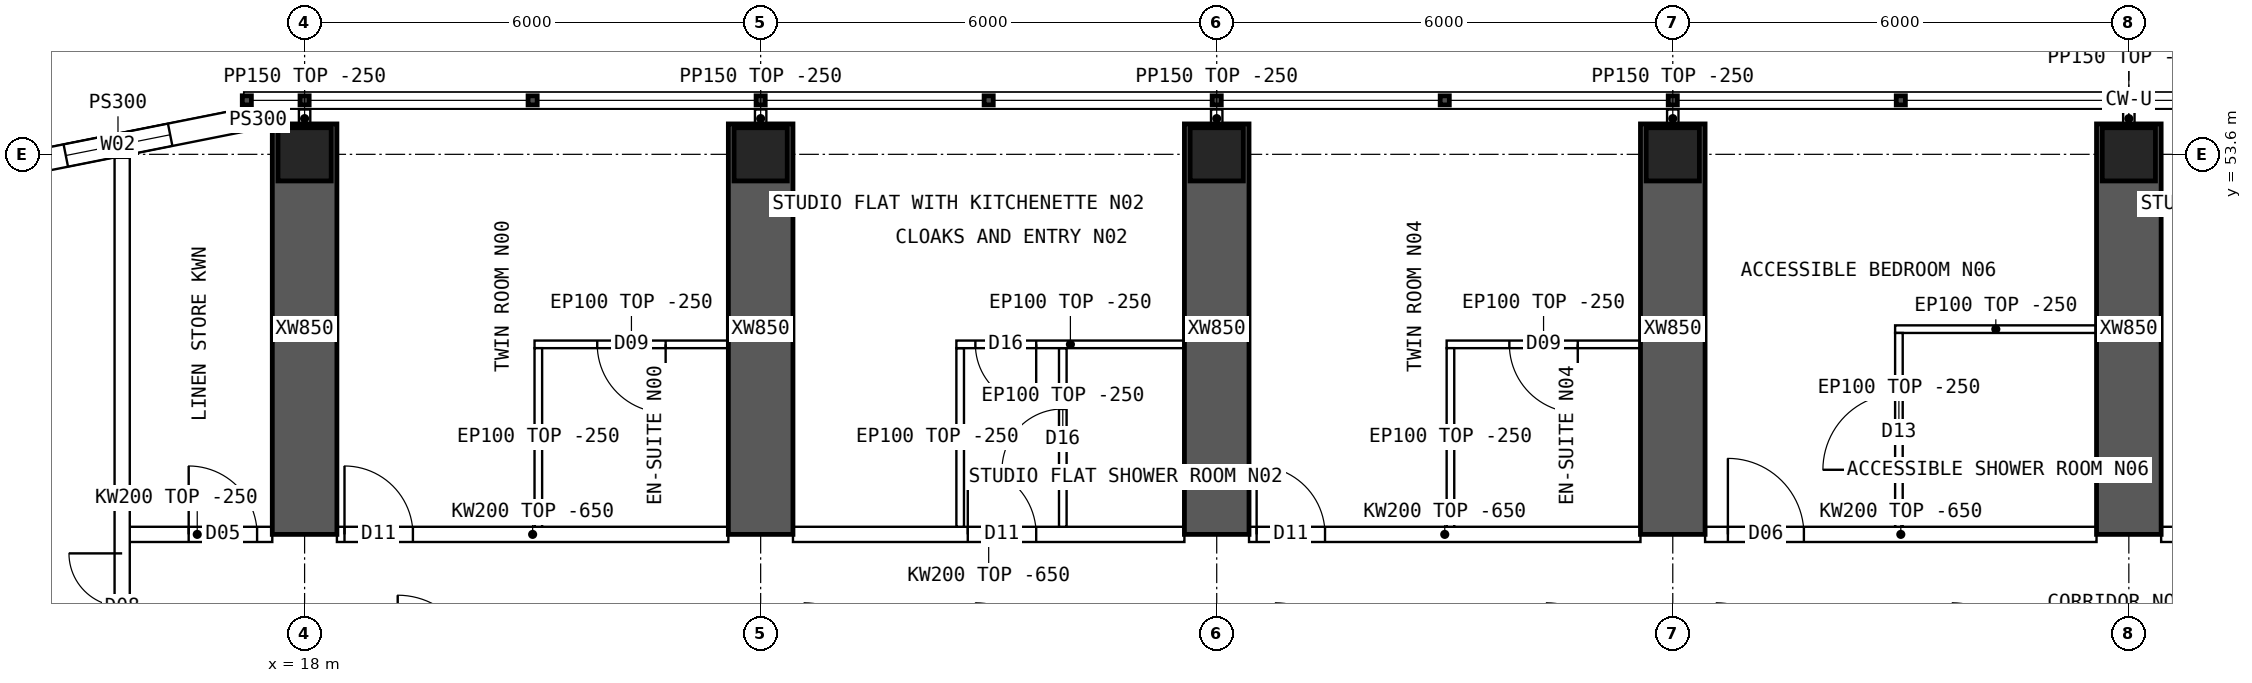
"""IFC4 building model, lengths in metres.
Left out: names, types, materials, properties, quantities, classifications, styles, units other than length and angle.
Written with IfcOpenShell. Run it as: python <this file> out.ifc"""

import sys

from ifc_helpers import new_model, si_unit, direction, frame, frame_2d, origin, origin_2d, place, context, subcontext, project, spatial, polyline, rectangle, hollow_rectangle, outline, extrude, element, fill, save


model = new_model("IFC4")
c1 = context("Model", 3, precision=1e-05, world=origin(), true_north=direction((0.0, 1.0)))
c2 = subcontext(c1, "Body", "Model", "MODEL_VIEW")
j1 = project(units=[si_unit("LENGTHUNIT", "METRE"), si_unit("PLANEANGLEUNIT", "RADIAN")], contexts=[c1])
p1 = place(None, origin())
s1 = spatial("IfcSite", under=j1, at=p1, CompositionType="ELEMENT")
p2 = place(p1, origin())
s2 = spatial("IfcBuilding", under=s1, at=p2, CompositionType="ELEMENT")
p3 = place(p2, frame((0.0, 0.0, 148.6)))
s3 = spatial("IfcBuildingStorey", under=s2, at=p3, CompositionType="ELEMENT", Elevation=148.6)
for number, where, z_axis, x_axis in (
    (1, (18.0, 53.6, 0.0), (0.0, 0.0, 1.0), (1.0, 0.0, 0.0)),
    (2, (24.0, 53.6, 0.0), (0.0, 0.0, 1.0), (1.0, 0.0, 0.0)),
    (3, (30.0, 53.6, 0.0), (0.0, 0.0, 1.0), (1.0, 0.0, 0.0)),
    (4, (36.0, 53.6, 0.0), (0.0, 0.0, 1.0), (1.0, 0.0, 0.0)),
    (5, (42.0, 53.6, 0.0), (0.0, 0.0, 1.0), (1.0, 0.0, 0.0)),
):
    element("IfcColumn", number, at=place(p3, frame(where, z_axis=z_axis, x_axis=x_axis)), inside=s3, PredefinedType="COLUMN", context=c2, shape_type="SweptSolid", body=[
        extrude(hollow_rectangle(XDim=0.7, YDim=0.7, WallThickness=0.07, at=origin_2d()), origin(), (0.0, 0.0, 1.0), 3.75),
    ])
for number, where, z_axis, x_axis in (
    (6, (18.0, 48.6, 0.0), (0.0, 0.0, 1.0), (0.0, 1.0, 0.0)),
    (7, (24.0, 48.6, 0.0), (0.0, 0.0, 1.0), (0.0, 1.0, 0.0)),
    (8, (30.0, 48.6, 0.0), (0.0, 0.0, 1.0), (0.0, 1.0, 0.0)),
    (9, (36.0, 48.6, 0.0), (0.0, 0.0, 1.0), (0.0, 1.0, 0.0)),
    (10, (42.0, 48.6, 0.0), (0.0, 0.0, 1.0), (0.0, 1.0, 0.0)),
):
    element("IfcWall", number, at=place(p3, frame(where, z_axis=z_axis, x_axis=x_axis)), inside=s3, PredefinedType="SHEAR", context=c2, shape_type="SweptSolid", body=[
        extrude(rectangle(XDim=5.4, YDim=0.85, at=frame_2d((2.7, 0.0))), origin(), (0.0, 0.0, 1.0), 3.75),
    ])
p4 = place(p3, frame((17.2, 54.05, 0.0), z_axis=(0.0, 0.0, 1.0), x_axis=(-0.98078325777, -0.195100490205, 0.0)))
e11 = element("IfcWall", 11, at=p4, inside=s3, PredefinedType="SOLIDWALL", context=c2, shape_type="SweptSolid", body=[
    extrude(outline(polyline([(-0.03, -0.15), (3.405, -0.15), (3.345, 0.15), (0.03, 0.15), (-0.03, -0.15)])), origin(), (0.0, 0.0, 1.0), 3.5),
])
p5 = place(p4, frame((0.988, 0.0, 0.9)))
e12 = element("IfcOpeningElement", 12, at=p5, cuts=e11, PredefinedType="OPENING", context=c2, shape_type="SweptSolid", body=[
    extrude(rectangle(XDim=1.4, YDim=1.8, at=frame_2d((0.7, 0.9))), frame((0.0, 0.16, 0.0), z_axis=(0.0, -1.0, 0.0), x_axis=(1.0, 0.0, 0.0)), (0.0, 0.0, 1.0), 0.32),
])
p6 = place(p3, frame((17.2, 54.05, 0.0), z_axis=(0.0, 0.0, 1.0), x_axis=(1.0, 0.0, 0.0)))
e13 = element("IfcWall", 13, at=p6, inside=s3, PredefinedType="SOLIDWALL", context=c2, shape_type="SweptSolid", body=[
    extrude(rectangle(XDim=0.375, YDim=0.3, at=frame_2d((0.188, 0.0))), origin(), (0.0, 0.0, 1.0), 3.5),
])
p7 = place(p3, frame((15.6, 48.6, 0.0), z_axis=(0.0, 0.0, 1.0), x_axis=(1.0, 0.0, 0.0)))
e14 = element("IfcWall", 14, at=p7, inside=s3, PredefinedType="SOLIDWALL", context=c2, shape_type="SweptSolid", body=[
    extrude(rectangle(XDim=1.975, YDim=0.2, at=frame_2d((0.987, 0.0))), origin(), (0.0, 0.0, 1.0), 3.5),
])
p8 = place(p7, frame((0.875, 0.0, 0.0)))
e15 = element("IfcOpeningElement", 15, at=p8, cuts=e14, PredefinedType="OPENING", context=c2, shape_type="SweptSolid", body=[
    extrude(rectangle(XDim=0.9, YDim=2.1, at=frame_2d((0.45, 1.05))), frame((0.0, 0.11, 0.0), z_axis=(0.0, -1.0, 0.0), x_axis=(1.0, 0.0, 0.0)), (0.0, 0.0, 1.0), 0.22),
])
p9 = place(p3, frame((18.425, 48.6, 0.0), z_axis=(0.0, 0.0, 1.0), x_axis=(1.0, 0.0, 0.0)))
e16 = element("IfcWall", 16, at=p9, inside=s3, PredefinedType="SOLIDWALL", context=c2, shape_type="SweptSolid", body=[
    extrude(outline(polyline([(0.0, 0.0), (5.15, 0.0), (5.15, 3.1), (0.0, 3.1), (0.0, 0.0)])), frame((0.0, 0.1, 0.0), z_axis=(0.0, -1.0, 0.0), x_axis=(1.0, 0.0, 0.0)), (0.0, 0.0, 1.0), 0.2),
])
p10 = place(p9, frame((0.1, 0.0, 0.0)))
e17 = element("IfcOpeningElement", 17, at=p10, cuts=e16, PredefinedType="OPENING", context=c2, shape_type="SweptSolid", body=[
    extrude(rectangle(XDim=0.9, YDim=2.1, at=frame_2d((0.45, 1.05))), frame((0.0, 0.11, 0.0), z_axis=(0.0, -1.0, 0.0), x_axis=(1.0, 0.0, 0.0)), (0.0, 0.0, 1.0), 0.22),
])
p11 = place(p3, frame((24.425, 48.6, 0.0), z_axis=(0.0, 0.0, 1.0), x_axis=(1.0, 0.0, 0.0)))
e18 = element("IfcWall", 18, at=p11, inside=s3, PredefinedType="SOLIDWALL", context=c2, shape_type="SweptSolid", body=[
    extrude(outline(polyline([(0.0, 0.0), (5.15, 0.0), (5.15, 3.1), (0.0, 3.1), (0.0, 0.0)])), frame((0.0, 0.1, 0.0), z_axis=(0.0, -1.0, 0.0), x_axis=(1.0, 0.0, 0.0)), (0.0, 0.0, 1.0), 0.2),
])
p12 = place(p11, frame((2.3, 0.0, 0.0)))
e19 = element("IfcOpeningElement", 19, at=p12, cuts=e18, PredefinedType="OPENING", context=c2, shape_type="SweptSolid", body=[
    extrude(rectangle(XDim=0.9, YDim=2.1, at=frame_2d((0.45, 1.05))), frame((0.0, 0.11, 0.0), z_axis=(0.0, -1.0, 0.0), x_axis=(1.0, 0.0, 0.0)), (0.0, 0.0, 1.0), 0.22),
])
p13 = place(p3, frame((30.425, 48.6, 0.0), z_axis=(0.0, 0.0, 1.0), x_axis=(1.0, 0.0, 0.0)))
e20 = element("IfcWall", 20, at=p13, inside=s3, PredefinedType="SOLIDWALL", context=c2, shape_type="SweptSolid", body=[
    extrude(outline(polyline([(0.0, 0.0), (5.15, 0.0), (5.15, 3.1), (0.0, 3.1), (0.0, 0.0)])), frame((0.0, 0.1, 0.0), z_axis=(0.0, -1.0, 0.0), x_axis=(1.0, 0.0, 0.0)), (0.0, 0.0, 1.0), 0.2),
])
p14 = place(p13, frame((0.1, 0.0, 0.0)))
e21 = element("IfcOpeningElement", 21, at=p14, cuts=e20, PredefinedType="OPENING", context=c2, shape_type="SweptSolid", body=[
    extrude(rectangle(XDim=0.9, YDim=2.1, at=frame_2d((0.45, 1.05))), frame((0.0, 0.11, 0.0), z_axis=(0.0, -1.0, 0.0), x_axis=(1.0, 0.0, 0.0)), (0.0, 0.0, 1.0), 0.22),
])
p15 = place(p3, frame((36.425, 48.6, 0.0), z_axis=(0.0, 0.0, 1.0), x_axis=(1.0, 0.0, 0.0)))
e22 = element("IfcWall", 22, at=p15, inside=s3, PredefinedType="SOLIDWALL", context=c2, shape_type="SweptSolid", body=[
    extrude(outline(polyline([(0.0, 0.0), (5.15, 0.0), (5.15, 3.1), (0.0, 3.1), (0.0, 0.0)])), frame((0.0, 0.1, 0.0), z_axis=(0.0, -1.0, 0.0), x_axis=(1.0, 0.0, 0.0)), (0.0, 0.0, 1.0), 0.2),
])
p16 = place(p15, frame((0.3, 0.0, 0.0)))
e23 = element("IfcOpeningElement", 23, at=p16, cuts=e22, PredefinedType="OPENING", context=c2, shape_type="SweptSolid", body=[
    extrude(rectangle(XDim=1.0, YDim=2.1, at=frame_2d((0.5, 1.05))), frame((0.0, 0.11, 0.0), z_axis=(0.0, -1.0, 0.0), x_axis=(1.0, 0.0, 0.0)), (0.0, 0.0, 1.0), 0.22),
])
p17 = place(p3, frame((42.425, 48.6, 0.0), z_axis=(0.0, 0.0, 1.0), x_axis=(1.0, 0.0, 0.0)))
e24 = element("IfcWall", 24, at=p17, inside=s3, PredefinedType="SOLIDWALL", context=c2, shape_type="SweptSolid", body=[
    extrude(outline(polyline([(0.0, 0.0), (5.15, 0.0), (5.15, 3.1), (0.0, 3.1), (0.0, 0.0)])), frame((0.0, 0.1, 0.0), z_axis=(0.0, -1.0, 0.0), x_axis=(1.0, 0.0, 0.0)), (0.0, 0.0, 1.0), 0.2),
])
p18 = place(p17, frame((2.3, 0.0, 0.0)))
e25 = element("IfcOpeningElement", 25, at=p18, cuts=e24, PredefinedType="OPENING", context=c2, shape_type="SweptSolid", body=[
    extrude(rectangle(XDim=0.9, YDim=2.1, at=frame_2d((0.45, 1.05))), frame((0.0, 0.11, 0.0), z_axis=(0.0, -1.0, 0.0), x_axis=(1.0, 0.0, 0.0)), (0.0, 0.0, 1.0), 0.22),
])
p19 = place(p3, frame((21.025, 51.1, 0.0), z_axis=(0.0, 0.0, 1.0), x_axis=(1.0, 0.0, 0.0)))
e26 = element("IfcWall", 26, at=p19, inside=s3, PredefinedType="PARTITIONING", context=c2, shape_type="SweptSolid", body=[
    extrude(rectangle(XDim=2.55, YDim=0.1, at=frame_2d((1.275, 0.0))), origin(), (0.0, 0.0, 1.0), 3.5),
])
p20 = place(p19, frame((0.825, 0.0, 0.0)))
e27 = element("IfcOpeningElement", 27, at=p20, cuts=e26, PredefinedType="OPENING", context=c2, shape_type="SweptSolid", body=[
    extrude(rectangle(XDim=0.9, YDim=2.1, at=frame_2d((0.45, 1.05))), frame((0.0, 0.06, 0.0), z_axis=(0.0, -1.0, 0.0), x_axis=(1.0, 0.0, 0.0)), (0.0, 0.0, 1.0), 0.12),
])
p21 = place(p3, frame((21.075, 51.05, 0.0), z_axis=(0.0, 0.0, 1.0), x_axis=(0.0, -1.0, 0.0)))
e28 = element("IfcWall", 28, at=p21, inside=s3, PredefinedType="PARTITIONING", context=c2, shape_type="SweptSolid", body=[
    extrude(outline(polyline([(0.0, 0.0), (2.35, 0.0), (2.35, 3.1), (2.302, 3.1), (2.3, 3.5), (0.0, 3.5), (0.0, 0.0)])), frame((0.0, 0.05, 0.0), z_axis=(0.0, -1.0, 0.0), x_axis=(1.0, 0.0, 0.0)), (0.0, 0.0, 1.0), 0.1),
])
p22 = place(p3, frame((26.575, 51.1, 0.0), z_axis=(0.0, 0.0, 1.0), x_axis=(1.0, 0.0, 0.0)))
e29 = element("IfcWall", 29, at=p22, inside=s3, PredefinedType="PARTITIONING", context=c2, shape_type="SweptSolid", body=[
    extrude(rectangle(XDim=3.0, YDim=0.1, at=frame_2d((1.5, 0.0))), origin(), (0.0, 0.0, 1.0), 3.5),
])
p23 = place(p22, frame((0.25, 0.0, 0.0)))
e30 = element("IfcOpeningElement", 30, at=p23, cuts=e29, PredefinedType="OPENING", context=c2, shape_type="SweptSolid", body=[
    extrude(rectangle(XDim=0.8, YDim=2.1, at=frame_2d((0.4, 1.05))), frame((0.0, 0.06, 0.0), z_axis=(0.0, -1.0, 0.0), x_axis=(1.0, 0.0, 0.0)), (0.0, 0.0, 1.0), 0.12),
])
p24 = place(p3, frame((26.625, 51.05, 0.0), z_axis=(0.0, 0.0, 1.0), x_axis=(0.0, -1.0, 0.0)))
e31 = element("IfcWall", 31, at=p24, inside=s3, PredefinedType="PARTITIONING", context=c2, shape_type="SweptSolid", body=[
    extrude(outline(polyline([(0.0, 0.0), (2.35, 0.0), (2.35, 3.1), (2.302, 3.1), (2.3, 3.5), (0.0, 3.5), (0.0, 0.0)])), frame((0.0, 0.05, 0.0), z_axis=(0.0, -1.0, 0.0), x_axis=(1.0, 0.0, 0.0)), (0.0, 0.0, 1.0), 0.1),
])
p25 = place(p3, frame((27.975, 51.05, 0.0), z_axis=(0.0, 0.0, 1.0), x_axis=(0.0, -1.0, 0.0)))
e32 = element("IfcWall", 32, at=p25, inside=s3, PredefinedType="PARTITIONING", context=c2, shape_type="SweptSolid", body=[
    extrude(outline(polyline([(0.0, 0.0), (2.35, 0.0), (2.35, 3.1), (2.302, 3.1), (2.3, 3.5), (0.0, 3.5), (0.0, 0.0)])), frame((0.0, 0.05, 0.0), z_axis=(0.0, -1.0, 0.0), x_axis=(1.0, 0.0, 0.0)), (0.0, 0.0, 1.0), 0.1),
])
p26 = place(p25, frame((0.8, 0.0, 0.0)))
e33 = element("IfcOpeningElement", 33, at=p26, cuts=e32, PredefinedType="OPENING", context=c2, shape_type="SweptSolid", body=[
    extrude(rectangle(XDim=0.8, YDim=2.1, at=frame_2d((0.4, 1.05))), frame((0.0, 0.06, 0.0), z_axis=(0.0, -1.0, 0.0), x_axis=(1.0, 0.0, 0.0)), (0.0, 0.0, 1.0), 0.12),
])
p27 = place(p3, frame((33.025, 51.1, 0.0), z_axis=(0.0, 0.0, 1.0), x_axis=(1.0, 0.0, 0.0)))
e34 = element("IfcWall", 34, at=p27, inside=s3, PredefinedType="PARTITIONING", context=c2, shape_type="SweptSolid", body=[
    extrude(rectangle(XDim=2.55, YDim=0.1, at=frame_2d((1.275, 0.0))), origin(), (0.0, 0.0, 1.0), 3.5),
])
p28 = place(p27, frame((0.825, 0.0, 0.0)))
e35 = element("IfcOpeningElement", 35, at=p28, cuts=e34, PredefinedType="OPENING", context=c2, shape_type="SweptSolid", body=[
    extrude(rectangle(XDim=0.9, YDim=2.1, at=frame_2d((0.45, 1.05))), frame((0.0, 0.06, 0.0), z_axis=(0.0, -1.0, 0.0), x_axis=(1.0, 0.0, 0.0)), (0.0, 0.0, 1.0), 0.12),
])
p29 = place(p3, frame((33.075, 51.05, 0.0), z_axis=(0.0, 0.0, 1.0), x_axis=(0.0, -1.0, 0.0)))
e36 = element("IfcWall", 36, at=p29, inside=s3, PredefinedType="PARTITIONING", context=c2, shape_type="SweptSolid", body=[
    extrude(outline(polyline([(0.0, 0.0), (2.35, 0.0), (2.35, 3.1), (2.302, 3.1), (2.3, 3.5), (0.0, 3.5), (0.0, 0.0)])), frame((0.0, 0.05, 0.0), z_axis=(0.0, -1.0, 0.0), x_axis=(1.0, 0.0, 0.0)), (0.0, 0.0, 1.0), 0.1),
])
p30 = place(p3, frame((38.925, 51.3, 0.0), z_axis=(0.0, 0.0, 1.0), x_axis=(1.0, 0.0, 0.0)))
e37 = element("IfcWall", 37, at=p30, inside=s3, PredefinedType="PARTITIONING", context=c2, shape_type="SweptSolid", body=[
    extrude(rectangle(XDim=2.65, YDim=0.1, at=frame_2d((1.325, 0.0))), origin(), (0.0, 0.0, 1.0), 3.5),
])
p31 = place(p3, frame((38.975, 51.25, 0.0), z_axis=(0.0, 0.0, 1.0), x_axis=(0.0, -1.0, 0.0)))
e38 = element("IfcWall", 38, at=p31, inside=s3, PredefinedType="PARTITIONING", context=c2, shape_type="SweptSolid", body=[
    extrude(outline(polyline([(0.0, 0.0), (2.55, 0.0), (2.55, 3.1), (2.502, 3.1), (2.5, 3.5), (0.0, 3.5), (0.0, 0.0)])), frame((0.0, 0.05, 0.0), z_axis=(0.0, -1.0, 0.0), x_axis=(1.0, 0.0, 0.0)), (0.0, 0.0, 1.0), 0.1),
])
p32 = place(p31, frame((0.8, 0.0, 0.0)))
e39 = element("IfcOpeningElement", 39, at=p32, cuts=e38, PredefinedType="OPENING", context=c2, shape_type="SweptSolid", body=[
    extrude(rectangle(XDim=1.0, YDim=2.1, at=frame_2d((0.5, 1.05))), frame((0.0, 0.06, 0.0), z_axis=(0.0, -1.0, 0.0), x_axis=(1.0, 0.0, 0.0)), (0.0, 0.0, 1.0), 0.12),
])
p33 = place(p3, frame((15.6, 10.446, 0.0), z_axis=(0.0, 0.0, 1.0), x_axis=(0.0, 1.0, 0.0)))
e40 = element("IfcWall", 40, at=p33, inside=s3, PredefinedType="SOLIDWALL", context=c2, shape_type="SweptSolid", body=[
    extrude(rectangle(XDim=43.107, YDim=0.2, at=frame_2d((21.554, 0.0))), origin(), (0.0, 0.0, 1.0), 3.5),
])
p34 = place(p33, frame((5.104, 0.0, 0.0)))
e41 = element("IfcOpeningElement", 41, at=p34, cuts=e40, PredefinedType="OPENING", context=c2, shape_type="SweptSolid", body=[
    extrude(rectangle(XDim=1.4, YDim=2.1, at=frame_2d((0.7, 1.05))), frame((0.0, 0.11, 0.0), z_axis=(0.0, -1.0, 0.0), x_axis=(1.0, 0.0, 0.0)), (0.0, 0.0, 1.0), 0.22),
])
p35 = place(p33, frame((36.504, 0.0, 0.0)))
e42 = element("IfcOpeningElement", 42, at=p35, cuts=e40, PredefinedType="OPENING", context=c2, shape_type="SweptSolid", body=[
    extrude(rectangle(XDim=1.4, YDim=2.1, at=frame_2d((0.7, 1.05))), frame((0.0, 0.11, 0.0), z_axis=(0.0, -1.0, 0.0), x_axis=(1.0, 0.0, 0.0)), (0.0, 0.0, 1.0), 0.22),
])
for number, where, z_axis, x_axis in (
    (43, (18.0, 53.95, 0.0), (0.0, 0.0, 1.0), (0.0, 1.0, 0.0)),
    (44, (24.0, 53.95, 0.0), (0.0, 0.0, 1.0), (0.0, 1.0, 0.0)),
    (45, (30.0, 53.95, 0.0), (0.0, 0.0, 1.0), (0.0, 1.0, 0.0)),
    (46, (36.0, 53.95, 0.0), (0.0, 0.0, 1.0), (0.0, 1.0, 0.0)),
    (47, (42.0, 53.95, 0.0), (0.0, 0.0, 1.0), (0.0, 1.0, 0.0)),
):
    element("IfcWall", number, at=place(p3, frame(where, z_axis=z_axis, x_axis=x_axis)), inside=s3, PredefinedType="PARTITIONING", context=c2, shape_type="SweptSolid", body=[
        extrude(rectangle(XDim=0.24, YDim=0.15, at=frame_2d((0.12, 0.0))), origin(), (0.0, 0.0, 1.0), 3.5),
    ])
p36 = place(p5, origin())
e48 = element("IfcWindow", 48, at=p36, inside=s3, PartitioningType="SINGLE_PANEL", PredefinedType="WINDOW", context=c2, shape_type="SweptSolid", body=[
    extrude(rectangle(XDim=1.4, YDim=1.8, at=frame_2d((0.7, 0.9))), frame((0.0, 0.03, 0.0), z_axis=(0.0, -1.0, 0.0), x_axis=(1.0, 0.0, 0.0)), (0.0, 0.0, 1.0), 0.06),
])
fill(e12, e48)
p37 = place(p20, origin())
e49 = element("IfcDoor", 49, at=p37, inside=s3, OperationType="SINGLE_SWING_RIGHT", PredefinedType="DOOR", context=c2, shape_type="SweptSolid", body=[
    extrude(rectangle(XDim=0.9, YDim=2.1, at=frame_2d((0.45, 1.05))), frame((0.0, 0.025, 0.0), z_axis=(0.0, -1.0, 0.0), x_axis=(1.0, 0.0, 0.0)), (0.0, 0.0, 1.0), 0.05),
])
fill(e27, e49)
p38 = place(p10, origin())
e50 = element("IfcDoor", 50, at=p38, inside=s3, OperationType="SINGLE_SWING_LEFT", PredefinedType="DOOR", context=c2, shape_type="SweptSolid", body=[
    extrude(rectangle(XDim=0.9, YDim=2.1, at=frame_2d((0.45, 1.05))), frame((0.0, 0.025, 0.0), z_axis=(0.0, -1.0, 0.0), x_axis=(1.0, 0.0, 0.0)), (0.0, 0.0, 1.0), 0.05),
])
fill(e17, e50)
p39 = place(p23, origin())
e51 = element("IfcDoor", 51, at=p39, inside=s3, OperationType="SINGLE_SWING_RIGHT", PredefinedType="DOOR", context=c2, shape_type="SweptSolid", body=[
    extrude(rectangle(XDim=0.8, YDim=2.1, at=frame_2d((0.4, 1.05))), frame((0.0, 0.025, 0.0), z_axis=(0.0, -1.0, 0.0), x_axis=(1.0, 0.0, 0.0)), (0.0, 0.0, 1.0), 0.05),
])
fill(e30, e51)
p40 = place(p26, origin())
e52 = element("IfcDoor", 52, at=p40, inside=s3, OperationType="SINGLE_SWING_RIGHT", PredefinedType="DOOR", context=c2, shape_type="SweptSolid", body=[
    extrude(rectangle(XDim=0.8, YDim=2.1, at=frame_2d((0.4, 1.05))), frame((0.0, 0.025, 0.0), z_axis=(0.0, -1.0, 0.0), x_axis=(1.0, 0.0, 0.0)), (0.0, 0.0, 1.0), 0.05),
])
fill(e33, e52)
p41 = place(p12, origin())
e53 = element("IfcDoor", 53, at=p41, inside=s3, OperationType="SINGLE_SWING_LEFT", PredefinedType="DOOR", context=c2, shape_type="SweptSolid", body=[
    extrude(rectangle(XDim=0.9, YDim=2.1, at=frame_2d((0.45, 1.05))), frame((0.0, 0.025, 0.0), z_axis=(0.0, -1.0, 0.0), x_axis=(1.0, 0.0, 0.0)), (0.0, 0.0, 1.0), 0.05),
])
fill(e19, e53)
p42 = place(p28, origin())
e54 = element("IfcDoor", 54, at=p42, inside=s3, OperationType="SINGLE_SWING_RIGHT", PredefinedType="DOOR", context=c2, shape_type="SweptSolid", body=[
    extrude(rectangle(XDim=0.9, YDim=2.1, at=frame_2d((0.45, 1.05))), frame((0.0, 0.025, 0.0), z_axis=(0.0, -1.0, 0.0), x_axis=(1.0, 0.0, 0.0)), (0.0, 0.0, 1.0), 0.05),
])
fill(e35, e54)
p43 = place(p14, origin())
e55 = element("IfcDoor", 55, at=p43, inside=s3, OperationType="SINGLE_SWING_LEFT", PredefinedType="DOOR", context=c2, shape_type="SweptSolid", body=[
    extrude(rectangle(XDim=0.9, YDim=2.1, at=frame_2d((0.45, 1.05))), frame((0.0, 0.025, 0.0), z_axis=(0.0, -1.0, 0.0), x_axis=(1.0, 0.0, 0.0)), (0.0, 0.0, 1.0), 0.05),
])
fill(e21, e55)
p44 = place(p32, origin())
e56 = element("IfcDoor", 56, at=p44, inside=s3, OperationType="SINGLE_SWING_RIGHT", PredefinedType="DOOR", context=c2, shape_type="SweptSolid", body=[
    extrude(rectangle(XDim=1.0, YDim=2.1, at=frame_2d((0.5, 1.05))), frame((0.0, 0.025, 0.0), z_axis=(0.0, -1.0, 0.0), x_axis=(1.0, 0.0, 0.0)), (0.0, 0.0, 1.0), 0.05),
])
fill(e39, e56)
p45 = place(p16, origin())
e57 = element("IfcDoor", 57, at=p45, inside=s3, OperationType="SINGLE_SWING_LEFT", PredefinedType="DOOR", context=c2, shape_type="SweptSolid", body=[
    extrude(rectangle(XDim=1.0, YDim=2.1, at=frame_2d((0.5, 1.05))), frame((0.0, 0.025, 0.0), z_axis=(0.0, -1.0, 0.0), x_axis=(1.0, 0.0, 0.0)), (0.0, 0.0, 1.0), 0.05),
])
fill(e23, e57)
p46 = place(p35, origin())
e58 = element("IfcDoor", 58, at=p46, inside=s3, OperationType="DOUBLE_DOOR_SINGLE_SWING", PredefinedType="DOOR", context=c2, shape_type="SweptSolid", body=[
    extrude(rectangle(XDim=1.4, YDim=2.1, at=frame_2d((0.7, 1.05))), frame((0.0, 0.025, 0.0), z_axis=(0.0, -1.0, 0.0), x_axis=(1.0, 0.0, 0.0)), (0.0, 0.0, 1.0), 0.05),
])
fill(e42, e58)
p47 = place(p8, origin())
e59 = element("IfcDoor", 59, at=p47, inside=s3, OperationType="SINGLE_SWING_LEFT", PredefinedType="DOOR", context=c2, shape_type="SweptSolid", body=[
    extrude(rectangle(XDim=0.9, YDim=2.1, at=frame_2d((0.45, 1.05))), frame((0.0, 0.025, 0.0), z_axis=(0.0, -1.0, 0.0), x_axis=(1.0, 0.0, 0.0)), (0.0, 0.0, 1.0), 0.05),
])
fill(e15, e59)
save(model, sys.argv[1])
